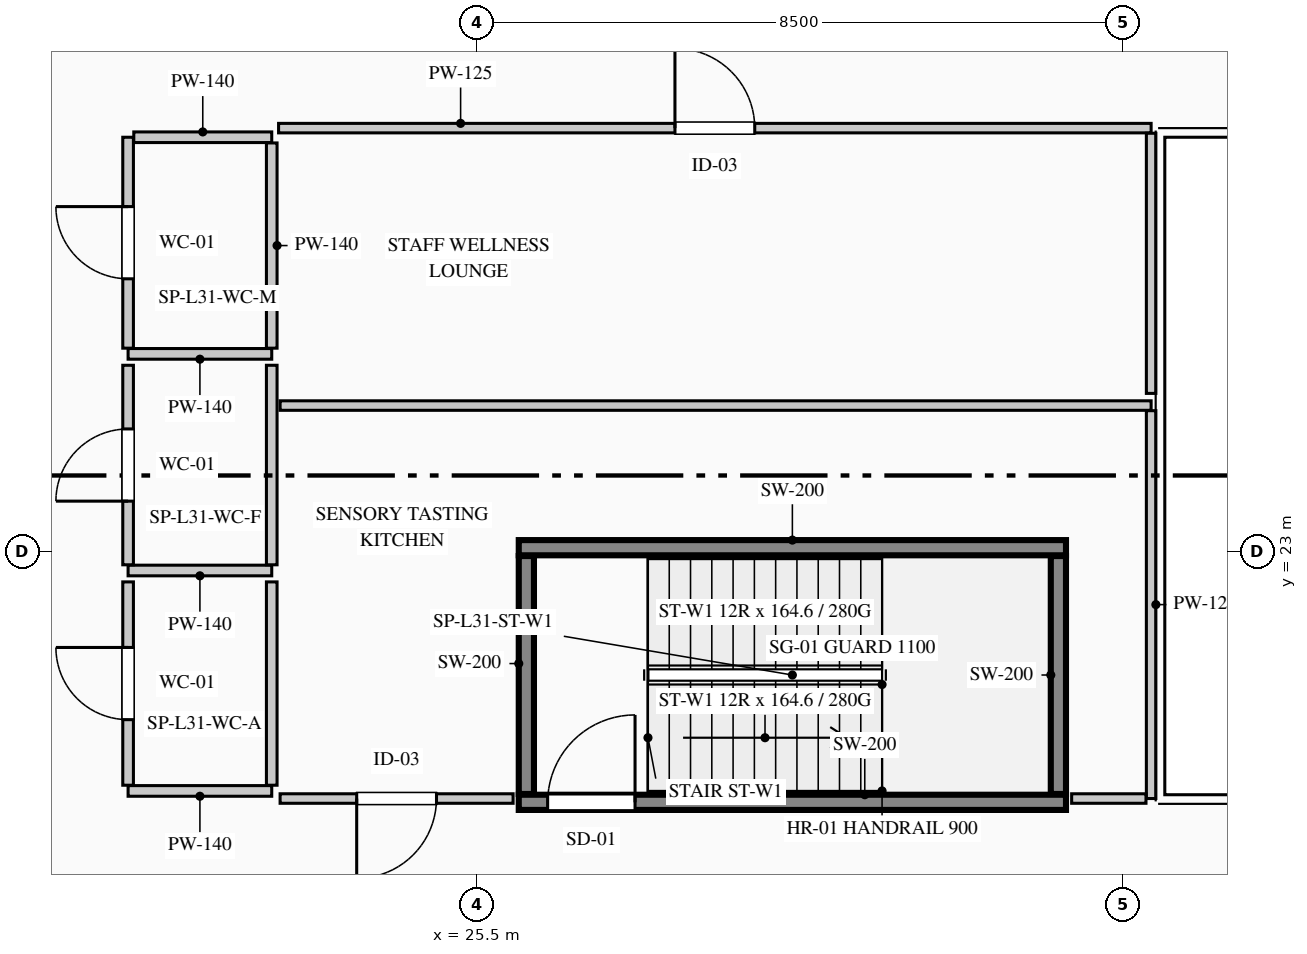
"""IFC4 building model, lengths in metres.
Left out: names, types, materials, properties, quantities, classifications, styles, units other than length and angle.
Written with IfcOpenShell. Run it as: python <this file> out.ifc"""

import sys

from ifc_helpers import new_model, si_unit, direction, frame, frame_2d, origin, place, context, subcontext, project, spatial, rectangle, extrude, element, fill, save


model = new_model("IFC4")
c1 = context("Model", 3, precision=1e-05, world=origin(), true_north=direction((0.0, 1.0)))
c2 = subcontext(c1, "Body", "Model", "MODEL_VIEW")
j1 = project(units=[si_unit("LENGTHUNIT", "METRE"), si_unit("PLANEANGLEUNIT", "RADIAN")], contexts=[c1])
p1 = place(None, origin())
s1 = spatial("IfcSite", under=j1, at=p1, CompositionType="ELEMENT")
p2 = place(p1, origin())
s2 = spatial("IfcBuilding", under=s1, at=p2, CompositionType="ELEMENT")
p3 = place(p2, frame((0.0, 0.0, 135.1)))
s3 = spatial("IfcBuildingStorey", under=s2, at=p3, CompositionType="ELEMENT", Elevation=135.1)
p4 = place(p3, frame((26.05, 19.7, 0.0), z_axis=(0.0, 0.0, 1.0), x_axis=(1.0, 0.0, 0.0)))
e1 = element("IfcWall", 1, at=p4, inside=s3, PredefinedType="SHEAR", context=c2, shape_type="SweptSolid", body=[
    extrude(rectangle(XDim=7.2, YDim=0.2, at=frame_2d((3.6, 0.0))), origin(), (0.0, 0.0, 1.0), 3.95),
])
p5 = place(p4, frame((0.38, 0.0, 0.0)))
e2 = element("IfcOpeningElement", 2, at=p5, cuts=e1, PredefinedType="OPENING", context=c2, shape_type="SweptSolid", body=[
    extrude(rectangle(XDim=1.15, YDim=2.2, at=frame_2d((0.575, 1.1))), frame((0.0, 0.11, 0.0), z_axis=(0.0, -1.0, 0.0), x_axis=(1.0, 0.0, 0.0)), (0.0, 0.0, 1.0), 0.22),
])
p6 = place(p3, frame((26.05, 23.05, 0.0), z_axis=(0.0, 0.0, 1.0), x_axis=(1.0, 0.0, 0.0)))
e3 = element("IfcWall", 3, at=p6, inside=s3, PredefinedType="SHEAR", context=c2, shape_type="SweptSolid", body=[
    extrude(rectangle(XDim=7.2, YDim=0.2, at=frame_2d((3.6, 0.0))), origin(), (0.0, 0.0, 1.0), 3.95),
])
for number, where, z_axis, x_axis in (
    (4, (26.15, 19.81, 0.0), (0.0, 0.0, 1.0), (0.0, 1.0, 0.0)),
    (5, (33.15, 19.81, 0.0), (0.0, 0.0, 1.0), (0.0, 1.0, 0.0)),
):
    element("IfcWall", number, at=place(p3, frame(where, z_axis=z_axis, x_axis=x_axis)), inside=s3, PredefinedType="SHEAR", context=c2, shape_type="SweptSolid", body=[
        extrude(rectangle(XDim=3.13, YDim=0.2, at=frame_2d((1.565, 0.0))), origin(), (0.0, 0.0, 1.0), 3.95),
    ])
p7 = place(p3, frame((22.8, 25.6, 0.0), z_axis=(0.0, 0.0, 1.0), x_axis=(-1.0, 0.0, 0.0)))
e6 = element("IfcWall", 6, at=p7, inside=s3, PredefinedType="PARTITIONING", context=c2, shape_type="SweptSolid", body=[
    extrude(rectangle(XDim=1.89, YDim=0.14, at=frame_2d((0.945, 0.0))), origin(), (0.0, 0.0, 1.0), 3.69),
])
p8 = place(p3, frame((20.91, 25.675, 0.0), z_axis=(0.0, 0.0, 1.0), x_axis=(0.0, 1.0, 0.0)))
e7 = element("IfcWall", 7, at=p8, inside=s3, PredefinedType="PARTITIONING", context=c2, shape_type="SweptSolid", body=[
    extrude(rectangle(XDim=2.775, YDim=0.14, at=frame_2d((1.387, 0.0))), origin(), (0.0, 0.0, 1.0), 3.69),
])
p9 = place(p8, frame((0.913, 0.0, 0.0)))
e8 = element("IfcOpeningElement", 8, at=p9, cuts=e7, PredefinedType="OPENING", context=c2, shape_type="SweptSolid", body=[
    extrude(rectangle(XDim=0.95, YDim=2.15, at=frame_2d((0.475, 1.075))), frame((0.0, 0.08, 0.0), z_axis=(0.0, -1.0, 0.0), x_axis=(1.0, 0.0, 0.0)), (0.0, 0.0, 1.0), 0.16),
])
p10 = place(p3, frame((20.985, 28.45, 0.0), z_axis=(0.0, 0.0, 1.0), x_axis=(1.0, 0.0, 0.0)))
e9 = element("IfcWall", 9, at=p10, inside=s3, PredefinedType="PARTITIONING", context=c2, shape_type="SweptSolid", body=[
    extrude(rectangle(XDim=1.815, YDim=0.14, at=frame_2d((0.907, 0.0))), origin(), (0.0, 0.0, 1.0), 3.69),
])
p11 = place(p3, frame((22.8, 28.375, 0.0), z_axis=(0.0, 0.0, 1.0), x_axis=(0.0, -1.0, 0.0)))
e10 = element("IfcWall", 10, at=p11, inside=s3, PredefinedType="PARTITIONING", context=c2, shape_type="SweptSolid", body=[
    extrude(rectangle(XDim=2.7, YDim=0.14, at=frame_2d((1.35, 0.0))), origin(), (0.0, 0.0, 1.0), 3.275),
])
p12 = place(p3, frame((22.8, 22.75, 0.0), z_axis=(0.0, 0.0, 1.0), x_axis=(-1.0, 0.0, 0.0)))
e11 = element("IfcWall", 11, at=p12, inside=s3, PredefinedType="PARTITIONING", context=c2, shape_type="SweptSolid", body=[
    extrude(rectangle(XDim=1.89, YDim=0.14, at=frame_2d((0.945, 0.0))), origin(), (0.0, 0.0, 1.0), 3.69),
])
p13 = place(p3, frame((20.91, 22.825, 0.0), z_axis=(0.0, 0.0, 1.0), x_axis=(0.0, 1.0, 0.0)))
e12 = element("IfcWall", 12, at=p13, inside=s3, PredefinedType="PARTITIONING", context=c2, shape_type="SweptSolid", body=[
    extrude(rectangle(XDim=2.625, YDim=0.14, at=frame_2d((1.312, 0.0))), origin(), (0.0, 0.0, 1.0), 3.69),
])
p14 = place(p13, frame((0.837, 0.0, 0.0)))
e13 = element("IfcOpeningElement", 13, at=p14, cuts=e12, PredefinedType="OPENING", context=c2, shape_type="SweptSolid", body=[
    extrude(rectangle(XDim=0.95, YDim=2.15, at=frame_2d((0.475, 1.075))), frame((0.0, 0.08, 0.0), z_axis=(0.0, -1.0, 0.0), x_axis=(1.0, 0.0, 0.0)), (0.0, 0.0, 1.0), 0.16),
])
p15 = place(p3, frame((22.8, 25.45, 0.0), z_axis=(0.0, 0.0, 1.0), x_axis=(0.0, -1.0, 0.0)))
e14 = element("IfcWall", 14, at=p15, inside=s3, PredefinedType="PARTITIONING", context=c2, shape_type="SweptSolid", body=[
    extrude(rectangle(XDim=2.625, YDim=0.14, at=frame_2d((1.312, 0.0))), origin(), (0.0, 0.0, 1.0), 3.275),
])
p16 = place(p3, frame((22.8, 19.85, 0.0), z_axis=(0.0, 0.0, 1.0), x_axis=(-1.0, 0.0, 0.0)))
e15 = element("IfcWall", 15, at=p16, inside=s3, PredefinedType="PARTITIONING", context=c2, shape_type="SweptSolid", body=[
    extrude(rectangle(XDim=1.89, YDim=0.14, at=frame_2d((0.945, 0.0))), origin(), (0.0, 0.0, 1.0), 3.69),
])
p17 = place(p3, frame((20.91, 19.925, 0.0), z_axis=(0.0, 0.0, 1.0), x_axis=(0.0, 1.0, 0.0)))
e16 = element("IfcWall", 16, at=p17, inside=s3, PredefinedType="PARTITIONING", context=c2, shape_type="SweptSolid", body=[
    extrude(rectangle(XDim=2.675, YDim=0.14, at=frame_2d((1.337, 0.0))), origin(), (0.0, 0.0, 1.0), 3.69),
])
p18 = place(p17, frame((0.863, 0.0, 0.0)))
e17 = element("IfcOpeningElement", 17, at=p18, cuts=e16, PredefinedType="OPENING", context=c2, shape_type="SweptSolid", body=[
    extrude(rectangle(XDim=0.95, YDim=2.15, at=frame_2d((0.475, 1.075))), frame((0.0, 0.08, 0.0), z_axis=(0.0, -1.0, 0.0), x_axis=(1.0, 0.0, 0.0)), (0.0, 0.0, 1.0), 0.16),
])
p19 = place(p3, frame((22.8, 22.6, 0.0), z_axis=(0.0, 0.0, 1.0), x_axis=(0.0, -1.0, 0.0)))
e18 = element("IfcWall", 18, at=p19, inside=s3, PredefinedType="PARTITIONING", context=c2, shape_type="SweptSolid", body=[
    extrude(rectangle(XDim=2.675, YDim=0.14, at=frame_2d((1.337, 0.0))), origin(), (0.0, 0.0, 1.0), 3.275),
])
p20 = place(p3, frame((25.976, 19.75, 0.0), z_axis=(0.0, 0.0, 1.0), x_axis=(-1.0, 0.0, 0.0)))
e19 = element("IfcWall", 19, at=p20, inside=s3, PredefinedType="PARTITIONING", context=c2, shape_type="SweptSolid", body=[
    extrude(rectangle(XDim=3.066, YDim=0.125, at=frame_2d((1.533, 0.0))), origin(), (0.0, 0.0, 1.0), 3.69),
])
p21 = place(p20, frame((1.008, 0.0, 0.0)))
e20 = element("IfcOpeningElement", 20, at=p21, cuts=e19, PredefinedType="OPENING", context=c2, shape_type="SweptSolid", body=[
    extrude(rectangle(XDim=1.05, YDim=2.15, at=frame_2d((0.525, 1.075))), frame((0.0, 0.073, 0.0), z_axis=(0.0, -1.0, 0.0), x_axis=(1.0, 0.0, 0.0)), (0.0, 0.0, 1.0), 0.145),
])
p22 = place(p3, frame((22.91, 24.92, 0.0), z_axis=(0.0, 0.0, 1.0), x_axis=(1.0, 0.0, 0.0)))
e21 = element("IfcWall", 21, at=p22, inside=s3, PredefinedType="PARTITIONING", context=c2, shape_type="SweptSolid", body=[
    extrude(rectangle(XDim=11.46, YDim=0.125, at=frame_2d((5.73, 0.0))), origin(), (0.0, 0.0, 1.0), 3.275),
])
p23 = place(p3, frame((34.37, 24.853, 0.0), z_axis=(0.0, 0.0, 1.0), x_axis=(0.0, -1.0, 0.0)))
e22 = element("IfcWall", 22, at=p23, inside=s3, PredefinedType="PARTITIONING", context=c2, shape_type="SweptSolid", body=[
    extrude(rectangle(XDim=5.103, YDim=0.125, at=frame_2d((2.551, 0.0))), origin(), (0.0, 0.0, 1.0), 3.69),
])
p24 = place(p3, frame((34.302, 19.75, 0.0), z_axis=(0.0, 0.0, 1.0), x_axis=(-1.0, 0.0, 0.0)))
e23 = element("IfcWall", 23, at=p24, inside=s3, PredefinedType="PARTITIONING", context=c2, shape_type="SweptSolid", body=[
    extrude(rectangle(XDim=0.978, YDim=0.125, at=frame_2d((0.489, 0.0))), origin(), (0.0, 0.0, 1.0), 3.69),
])
p25 = place(p3, frame((22.89, 28.57, 0.0), z_axis=(0.0, 0.0, 1.0), x_axis=(1.0, 0.0, 0.0)))
e24 = element("IfcWall", 24, at=p25, inside=s3, PredefinedType="PARTITIONING", context=c2, shape_type="SweptSolid", body=[
    extrude(rectangle(XDim=11.48, YDim=0.125, at=frame_2d((5.74, 0.0))), origin(), (0.0, 0.0, 1.0), 3.275),
])
p26 = place(p25, frame((5.215, 0.0, 0.0)))
e25 = element("IfcOpeningElement", 25, at=p26, cuts=e24, PredefinedType="OPENING", context=c2, shape_type="SweptSolid", body=[
    extrude(rectangle(XDim=1.05, YDim=2.15, at=frame_2d((0.525, 1.075))), frame((0.0, 0.073, 0.0), z_axis=(0.0, -1.0, 0.0), x_axis=(1.0, 0.0, 0.0)), (0.0, 0.0, 1.0), 0.145),
])
p27 = place(p3, frame((34.37, 28.502, 0.0), z_axis=(0.0, 0.0, 1.0), x_axis=(0.0, -1.0, 0.0)))
e26 = element("IfcWall", 26, at=p27, inside=s3, PredefinedType="PARTITIONING", context=c2, shape_type="SweptSolid", body=[
    extrude(rectangle(XDim=3.422, YDim=0.125, at=frame_2d((1.711, 0.0))), origin(), (0.0, 0.0, 1.0), 3.69),
])
p28 = place(p5, origin())
e27 = element("IfcDoor", 27, at=p28, inside=s3, OperationType="SINGLE_SWING_RIGHT", PredefinedType="DOOR", context=c2, shape_type="SweptSolid", body=[
    extrude(rectangle(XDim=1.15, YDim=2.2, at=frame_2d((0.575, 1.1))), frame((0.0, 0.025, 0.0), z_axis=(0.0, -1.0, 0.0), x_axis=(1.0, 0.0, 0.0)), (0.0, 0.0, 1.0), 0.05),
])
fill(e2, e27)
p29 = place(p9, origin())
e28 = element("IfcDoor", 28, at=p29, inside=s3, OperationType="SINGLE_SWING_RIGHT", PredefinedType="DOOR", context=c2, shape_type="SweptSolid", body=[
    extrude(rectangle(XDim=0.95, YDim=2.15, at=frame_2d((0.475, 1.075))), frame((0.0, 0.025, 0.0), z_axis=(0.0, -1.0, 0.0), x_axis=(1.0, 0.0, 0.0)), (0.0, 0.0, 1.0), 0.05),
])
fill(e8, e28)
p30 = place(p14, origin())
e29 = element("IfcDoor", 29, at=p30, inside=s3, OperationType="SINGLE_SWING_LEFT", PredefinedType="DOOR", context=c2, shape_type="SweptSolid", body=[
    extrude(rectangle(XDim=0.95, YDim=2.15, at=frame_2d((0.475, 1.075))), frame((0.0, 0.025, 0.0), z_axis=(0.0, -1.0, 0.0), x_axis=(1.0, 0.0, 0.0)), (0.0, 0.0, 1.0), 0.05),
])
fill(e13, e29)
p31 = place(p18, origin())
e30 = element("IfcDoor", 30, at=p31, inside=s3, OperationType="SINGLE_SWING_RIGHT", PredefinedType="DOOR", context=c2, shape_type="SweptSolid", body=[
    extrude(rectangle(XDim=0.95, YDim=2.15, at=frame_2d((0.475, 1.075))), frame((0.0, 0.025, 0.0), z_axis=(0.0, -1.0, 0.0), x_axis=(1.0, 0.0, 0.0)), (0.0, 0.0, 1.0), 0.05),
])
fill(e17, e30)
p32 = place(p21, origin())
e31 = element("IfcDoor", 31, at=p32, inside=s3, OperationType="SINGLE_SWING_RIGHT", PredefinedType="DOOR", context=c2, shape_type="SweptSolid", body=[
    extrude(rectangle(XDim=1.05, YDim=2.15, at=frame_2d((0.525, 1.075))), frame((0.0, 0.025, 0.0), z_axis=(0.0, -1.0, 0.0), x_axis=(1.0, 0.0, 0.0)), (0.0, 0.0, 1.0), 0.05),
])
fill(e20, e31)
p33 = place(p26, origin())
e32 = element("IfcDoor", 32, at=p33, inside=s3, OperationType="SINGLE_SWING_LEFT", PredefinedType="DOOR", context=c2, shape_type="SweptSolid", body=[
    extrude(rectangle(XDim=1.05, YDim=2.15, at=frame_2d((0.525, 1.075))), frame((0.0, 0.025, 0.0), z_axis=(0.0, -1.0, 0.0), x_axis=(1.0, 0.0, 0.0)), (0.0, 0.0, 1.0), 0.05),
])
fill(e25, e32)
save(model, sys.argv[1])
